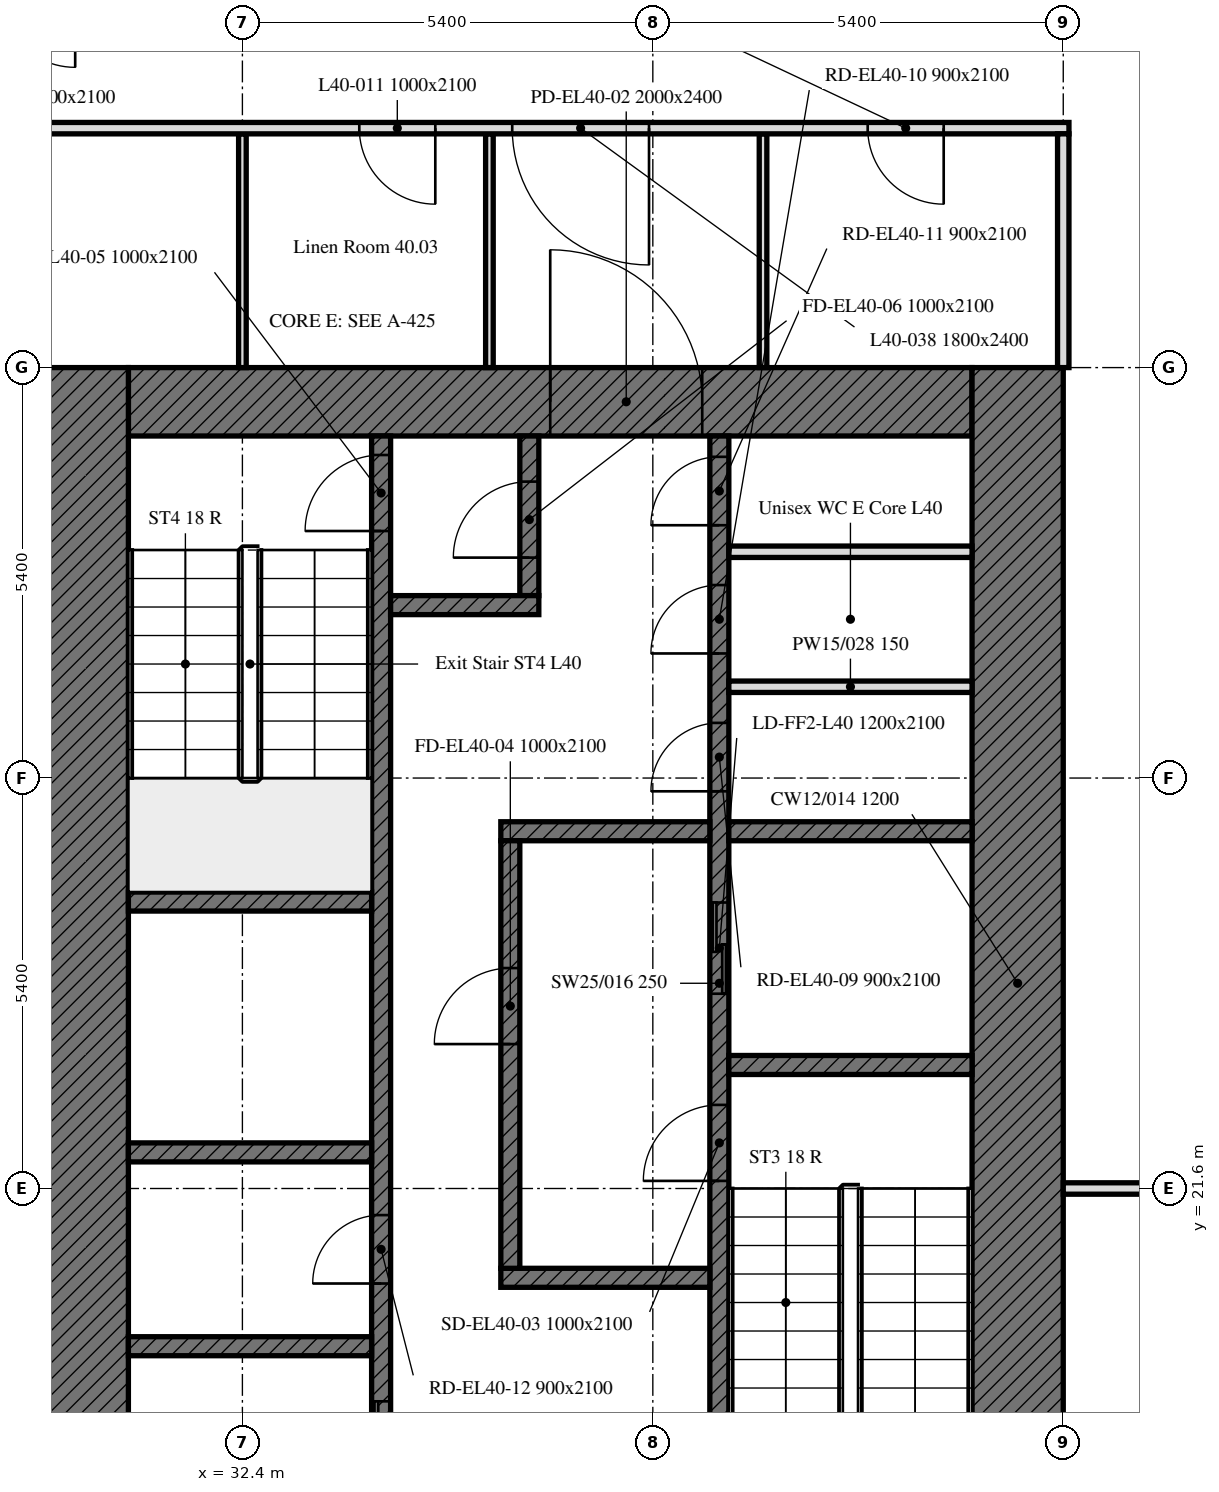
"""IFC4 building model, lengths in metres.
Left out: names, types, materials, properties, quantities, classifications, styles, units other than length and angle.
Written with IfcOpenShell. Run it as: python <this file> out.ifc"""

import sys

from ifc_helpers import new_model, si_unit, direction, frame, frame_2d, origin, place, context, subcontext, project, spatial, rectangle, extrude, element, fill, save


model = new_model("IFC4")
c1 = context("Model", 3, precision=1e-05, world=origin(), true_north=direction((0.0, 1.0)))
c2 = subcontext(c1, "Body", "Model", "MODEL_VIEW")
j1 = project(units=[si_unit("LENGTHUNIT", "METRE"), si_unit("PLANEANGLEUNIT", "RADIAN")], contexts=[c1])
p1 = place(None, origin())
s1 = spatial("IfcSite", under=j1, at=p1, CompositionType="ELEMENT")
p2 = place(p1, origin())
s2 = spatial("IfcBuilding", under=s1, at=p2, CompositionType="ELEMENT")
p3 = place(p2, frame((0.0, 0.0, 169.3)))
s3 = spatial("IfcBuildingStorey", under=s2, at=p3, CompositionType="ELEMENT", Elevation=169.3)
p4 = place(p3, frame((30.9, 31.95, 0.0), z_axis=(0.0, 0.0, 1.0), x_axis=(1.0, 0.0, 0.0)))
e1 = element("IfcWall", 1, at=p4, inside=s3, PredefinedType="SOLIDWALL", context=c2, shape_type="SweptSolid", body=[
    extrude(rectangle(XDim=11.1, YDim=0.9, at=frame_2d((5.55, 0.0))), origin(), (0.0, 0.0, 1.0), 3.0),
])
p5 = place(p4, frame((5.55, 0.0, 0.0)))
e2 = element("IfcOpeningElement", 2, at=p5, cuts=e1, PredefinedType="OPENING", context=c2, shape_type="SweptSolid", body=[
    extrude(rectangle(XDim=2.0, YDim=2.4, at=frame_2d((1.0, 1.2))), frame((0.0, 0.45, 0.0), z_axis=(0.0, -1.0, 0.0), x_axis=(1.0, 0.0, 0.0)), (0.0, 0.0, 1.0), 0.9),
])
for number, where, z_axis, x_axis in (
    (3, (42.6, 32.4, 0.0), (0.0, 0.0, 1.0), (0.0, -1.0, 0.0)),
    (4, (30.3, 16.2, 0.0), (0.0, 0.0, 1.0), (0.0, 1.0, 0.0)),
):
    element("IfcWall", number, at=place(p3, frame(where, z_axis=z_axis, x_axis=x_axis)), inside=s3, PredefinedType="SOLIDWALL", context=c2, shape_type="SweptSolid", body=[
        extrude(rectangle(XDim=16.2, YDim=1.2, at=frame_2d((8.1, 0.0))), origin(), (0.0, 0.0, 1.0), 3.0),
    ])
p6 = place(p3, frame((38.675, 17.1, 0.0), z_axis=(0.0, 0.0, 1.0), x_axis=(0.0, 1.0, 0.0)))
e5 = element("IfcWall", 5, at=p6, inside=s3, PredefinedType="SOLIDWALL", context=c2, shape_type="SweptSolid", body=[
    extrude(rectangle(XDim=14.4, YDim=0.25, at=frame_2d((7.2, 0.0))), origin(), (0.0, 0.0, 1.0), 3.0),
])
p7 = place(p6, frame((4.6, 0.0, 0.0)))
e6 = element("IfcOpeningElement", 6, at=p7, cuts=e5, PredefinedType="OPENING", context=c2, shape_type="SweptSolid", body=[
    extrude(rectangle(XDim=1.0, YDim=2.1, at=frame_2d((0.5, 1.05))), frame((0.0, 0.125, 0.0), z_axis=(0.0, -1.0, 0.0), x_axis=(1.0, 0.0, 0.0)), (0.0, 0.0, 1.0), 0.25),
])
p8 = place(p6, frame((7.062, 0.0, 0.0)))
e7 = element("IfcOpeningElement", 7, at=p8, cuts=e5, PredefinedType="OPENING", context=c2, shape_type="SweptSolid", body=[
    extrude(rectangle(XDim=1.2, YDim=2.1, at=frame_2d((0.6, 1.05))), frame((0.0, 0.125, 0.0), z_axis=(0.0, -1.0, 0.0), x_axis=(1.0, 0.0, 0.0)), (0.0, 0.0, 1.0), 0.25),
])
p9 = place(p6, frame((9.726, 0.0, 0.0)))
e8 = element("IfcOpeningElement", 8, at=p9, cuts=e5, PredefinedType="OPENING", context=c2, shape_type="SweptSolid", body=[
    extrude(rectangle(XDim=0.9, YDim=2.1, at=frame_2d((0.45, 1.05))), frame((0.0, 0.125, 0.0), z_axis=(0.0, -1.0, 0.0), x_axis=(1.0, 0.0, 0.0)), (0.0, 0.0, 1.0), 0.25),
])
p10 = place(p6, frame((11.539, 0.0, 0.0)))
e9 = element("IfcOpeningElement", 9, at=p10, cuts=e5, PredefinedType="OPENING", context=c2, shape_type="SweptSolid", body=[
    extrude(rectangle(XDim=0.9, YDim=2.1, at=frame_2d((0.45, 1.05))), frame((0.0, 0.125, 0.0), z_axis=(0.0, -1.0, 0.0), x_axis=(1.0, 0.0, 0.0)), (0.0, 0.0, 1.0), 0.25),
])
p11 = place(p6, frame((13.226, 0.0, 0.0)))
e10 = element("IfcOpeningElement", 10, at=p11, cuts=e5, PredefinedType="OPENING", context=c2, shape_type="SweptSolid", body=[
    extrude(rectangle(XDim=0.9, YDim=2.1, at=frame_2d((0.45, 1.05))), frame((0.0, 0.125, 0.0), z_axis=(0.0, -1.0, 0.0), x_axis=(1.0, 0.0, 0.0)), (0.0, 0.0, 1.0), 0.25),
])
p12 = place(p3, frame((34.225, 17.1, 0.0), z_axis=(0.0, 0.0, 1.0), x_axis=(0.0, 1.0, 0.0)))
e11 = element("IfcWall", 11, at=p12, inside=s3, PredefinedType="SOLIDWALL", context=c2, shape_type="SweptSolid", body=[
    extrude(rectangle(XDim=14.4, YDim=0.25, at=frame_2d((7.2, 0.0))), origin(), (0.0, 0.0, 1.0), 3.0),
])
p13 = place(p12, frame((13.15, 0.0, 0.0)))
e12 = element("IfcOpeningElement", 12, at=p13, cuts=e11, PredefinedType="OPENING", context=c2, shape_type="SweptSolid", body=[
    extrude(rectangle(XDim=1.0, YDim=2.1, at=frame_2d((0.5, 1.05))), frame((0.0, 0.125, 0.0), z_axis=(0.0, -1.0, 0.0), x_axis=(1.0, 0.0, 0.0)), (0.0, 0.0, 1.0), 0.25),
])
p14 = place(p12, frame((0.6, 0.0, 0.0)))
e13 = element("IfcOpeningElement", 13, at=p14, cuts=e11, PredefinedType="OPENING", context=c2, shape_type="SweptSolid", body=[
    extrude(rectangle(XDim=1.1, YDim=2.1, at=frame_2d((0.55, 1.05))), frame((0.0, 0.125, 0.0), z_axis=(0.0, -1.0, 0.0), x_axis=(1.0, 0.0, 0.0)), (0.0, 0.0, 1.0), 0.25),
])
p15 = place(p12, frame((3.25, 0.0, 0.0)))
e14 = element("IfcOpeningElement", 14, at=p15, cuts=e11, PredefinedType="OPENING", context=c2, shape_type="SweptSolid", body=[
    extrude(rectangle(XDim=0.9, YDim=2.1, at=frame_2d((0.45, 1.05))), frame((0.0, 0.125, 0.0), z_axis=(0.0, -1.0, 0.0), x_axis=(1.0, 0.0, 0.0)), (0.0, 0.0, 1.0), 0.25),
])
p16 = place(p3, frame((38.8, 23.225, 0.0), z_axis=(0.0, 0.0, 1.0), x_axis=(1.0, 0.0, 0.0)))
e15 = element("IfcWall", 15, at=p16, inside=s3, PredefinedType="SOLIDWALL", context=c2, shape_type="SweptSolid", body=[
    extrude(rectangle(XDim=3.2, YDim=0.25, at=frame_2d((1.6, 0.0))), origin(), (0.0, 0.0, 1.0), 3.0),
])
for number, where, z_axis, x_axis in (
    (16, (30.9, 25.375, 0.0), (0.0, 0.0, 1.0), (1.0, 0.0, 0.0)),
    (17, (30.9, 22.075, 0.0), (0.0, 0.0, 1.0), (1.0, 0.0, 0.0)),
):
    element("IfcWall", number, at=place(p3, frame(where, z_axis=z_axis, x_axis=x_axis)), inside=s3, PredefinedType="SOLIDWALL", context=c2, shape_type="SweptSolid", body=[
        extrude(rectangle(XDim=3.2, YDim=0.25, at=frame_2d((1.6, 0.0))), origin(), (0.0, 0.0, 1.0), 3.0),
    ])
p17 = place(p3, frame((38.8, 26.3, 0.0), z_axis=(0.0, 0.0, 1.0), x_axis=(1.0, 0.0, 0.0)))
e18 = element("IfcWall", 18, at=p17, inside=s3, PredefinedType="SOLIDWALL", context=c2, shape_type="SweptSolid", body=[
    extrude(rectangle(XDim=3.2, YDim=0.25, at=frame_2d((1.6, 0.0))), origin(), (0.0, 0.0, 1.0), 3.0),
])
for number, where, z_axis, x_axis in (
    (19, (35.8, 26.3, 0.0), (0.0, 0.0, 1.0), (1.0, 0.0, 0.0)),
    (20, (35.8, 20.425, 0.0), (0.0, 0.0, 1.0), (1.0, 0.0, 0.0)),
):
    element("IfcWall", number, at=place(p3, frame(where, z_axis=z_axis, x_axis=x_axis)), inside=s3, PredefinedType="SOLIDWALL", context=c2, shape_type="SweptSolid", body=[
        extrude(rectangle(XDim=2.75, YDim=0.25, at=frame_2d((1.375, 0.0))), origin(), (0.0, 0.0, 1.0), 3.0),
    ])
p18 = place(p3, frame((36.175, 29.4, 0.0), z_axis=(0.0, 0.0, 1.0), x_axis=(0.0, 1.0, 0.0)))
e21 = element("IfcWall", 21, at=p18, inside=s3, PredefinedType="SOLIDWALL", context=c2, shape_type="SweptSolid", body=[
    extrude(rectangle(XDim=2.1, YDim=0.25, at=frame_2d((1.05, 0.0))), origin(), (0.0, 0.0, 1.0), 3.0),
])
p19 = place(p18, frame((0.5, 0.0, 0.0)))
e22 = element("IfcOpeningElement", 22, at=p19, cuts=e21, PredefinedType="OPENING", context=c2, shape_type="SweptSolid", body=[
    extrude(rectangle(XDim=1.0, YDim=2.1, at=frame_2d((0.5, 1.05))), frame((0.0, 0.125, 0.0), z_axis=(0.0, -1.0, 0.0), x_axis=(1.0, 0.0, 0.0)), (0.0, 0.0, 1.0), 0.25),
])
p20 = place(p3, frame((34.35, 29.275, 0.0), z_axis=(0.0, 0.0, 1.0), x_axis=(1.0, 0.0, 0.0)))
e23 = element("IfcWall", 23, at=p20, inside=s3, PredefinedType="SOLIDWALL", context=c2, shape_type="SweptSolid", body=[
    extrude(rectangle(XDim=1.95, YDim=0.25, at=frame_2d((0.975, 0.0))), origin(), (0.0, 0.0, 1.0), 3.0),
])
p21 = place(p3, frame((35.925, 20.55, 0.0), z_axis=(0.0, 0.0, 1.0), x_axis=(0.0, 1.0, 0.0)))
e24 = element("IfcWall", 24, at=p21, inside=s3, PredefinedType="SOLIDWALL", context=c2, shape_type="SweptSolid", body=[
    extrude(rectangle(XDim=5.625, YDim=0.25, at=frame_2d((2.812, 0.0))), origin(), (0.0, 0.0, 1.0), 3.0),
])
p22 = place(p21, frame((2.95, 0.0, 0.0)))
e25 = element("IfcOpeningElement", 25, at=p22, cuts=e24, PredefinedType="OPENING", context=c2, shape_type="SweptSolid", body=[
    extrude(rectangle(XDim=1.0, YDim=2.1, at=frame_2d((0.5, 1.05))), frame((0.0, 0.125, 0.0), z_axis=(0.0, -1.0, 0.0), x_axis=(1.0, 0.0, 0.0)), (0.0, 0.0, 1.0), 0.25),
])
p23 = place(p3, frame((30.9, 19.525, 0.0), z_axis=(0.0, 0.0, 1.0), x_axis=(1.0, 0.0, 0.0)))
e26 = element("IfcWall", 26, at=p23, inside=s3, PredefinedType="SOLIDWALL", context=c2, shape_type="SweptSolid", body=[
    extrude(rectangle(XDim=3.2, YDim=0.25, at=frame_2d((1.6, 0.0))), origin(), (0.0, 0.0, 1.0), 3.0),
])
for number, where, z_axis, x_axis in (
    (27, (38.8, 28.201, 0.0), (0.0, 0.0, 1.0), (1.0, 0.0, 0.0)),
    (28, (38.8, 29.977, 0.0), (0.0, 0.0, 1.0), (1.0, 0.0, 0.0)),
):
    element("IfcWall", number, at=place(p3, frame(where, z_axis=z_axis, x_axis=x_axis)), inside=s3, PredefinedType="PARTITIONING", context=c2, shape_type="SweptSolid", body=[
        extrude(rectangle(XDim=3.2, YDim=0.15, at=frame_2d((1.6, 0.0))), origin(), (0.0, 0.0, 1.0), 3.0),
    ])
for number, where, z_axis, x_axis in (
    (29, (32.4, 32.4, 0.0), (0.0, 0.0, 1.0), (0.0, 1.0, 0.0)),
    (30, (35.65, 35.475, 0.0), (0.0, 0.0, 1.0), (0.0, -1.0, 0.0)),
    (31, (39.25, 32.4, 0.0), (0.0, 0.0, 1.0), (0.0, 1.0, 0.0)),
):
    element("IfcWall", number, at=place(p3, frame(where, z_axis=z_axis, x_axis=x_axis)), inside=s3, PredefinedType="PARTITIONING", context=c2, shape_type="SweptSolid", body=[
        extrude(rectangle(XDim=3.075, YDim=0.1, at=frame_2d((1.538, 0.0))), origin(), (0.0, 0.0, 1.0), 3.0),
    ])
p24 = place(p3, frame((43.2, 21.6, 0.0), z_axis=(0.0, 0.0, 1.0), x_axis=(1.0, 0.0, 0.0)))
e32 = element("IfcWall", 32, at=p24, inside=s3, PredefinedType="PARTITIONING", context=c2, shape_type="SweptSolid", body=[
    extrude(rectangle(XDim=4.649, YDim=0.15, at=frame_2d((2.325, 0.0))), origin(), (0.0, 0.0, 1.0), 2.4),
])
p25 = place(p3, frame((43.275, 35.55, 0.0), z_axis=(0.0, 0.0, 1.0), x_axis=(-1.0, 0.0, 0.0)))
e33 = element("IfcWall", 33, at=p25, inside=s3, PredefinedType="PARTITIONING", context=c2, shape_type="SweptSolid", body=[
    extrude(rectangle(XDim=33.825, YDim=0.15, at=frame_2d((16.913, 0.0))), origin(), (0.0, 0.0, 1.0), 3.0),
])
p26 = place(p25, frame((23.875, 0.0, 0.0)))
e34 = element("IfcOpeningElement", 34, at=p26, cuts=e33, PredefinedType="OPENING", context=c2, shape_type="SweptSolid", body=[
    extrude(rectangle(XDim=1.0, YDim=2.1, at=frame_2d((0.5, 1.05))), frame((0.0, 0.075, 0.0), z_axis=(0.0, -1.0, 0.0), x_axis=(1.0, 0.0, 0.0)), (0.0, 0.0, 1.0), 0.15),
])
p27 = place(p25, frame((13.475, 0.0, 0.0)))
e35 = element("IfcOpeningElement", 35, at=p27, cuts=e33, PredefinedType="OPENING", context=c2, shape_type="SweptSolid", body=[
    extrude(rectangle(XDim=1.0, YDim=2.1, at=frame_2d((0.5, 1.05))), frame((0.0, 0.075, 0.0), z_axis=(0.0, -1.0, 0.0), x_axis=(1.0, 0.0, 0.0)), (0.0, 0.0, 1.0), 0.15),
])
p28 = place(p25, frame((8.337, 0.0, 0.0)))
e36 = element("IfcOpeningElement", 36, at=p28, cuts=e33, PredefinedType="OPENING", context=c2, shape_type="SweptSolid", body=[
    extrude(rectangle(XDim=1.0, YDim=2.1, at=frame_2d((0.5, 1.05))), frame((0.0, 0.075, 0.0), z_axis=(0.0, -1.0, 0.0), x_axis=(1.0, 0.0, 0.0)), (0.0, 0.0, 1.0), 0.15),
])
p29 = place(p25, frame((1.648, 0.0, 0.0)))
e37 = element("IfcOpeningElement", 37, at=p29, cuts=e33, PredefinedType="OPENING", context=c2, shape_type="SweptSolid", body=[
    extrude(rectangle(XDim=1.0, YDim=2.1, at=frame_2d((0.5, 1.05))), frame((0.0, 0.075, 0.0), z_axis=(0.0, -1.0, 0.0), x_axis=(1.0, 0.0, 0.0)), (0.0, 0.0, 1.0), 0.15),
])
p30 = place(p25, frame((28.613, 0.0, 0.0)))
e38 = element("IfcOpeningElement", 38, at=p30, cuts=e33, PredefinedType="OPENING", context=c2, shape_type="SweptSolid", body=[
    extrude(rectangle(XDim=1.0, YDim=2.1, at=frame_2d((0.5, 1.05))), frame((0.0, 0.075, 0.0), z_axis=(0.0, -1.0, 0.0), x_axis=(1.0, 0.0, 0.0)), (0.0, 0.0, 1.0), 0.15),
])
p31 = place(p25, frame((30.625, 0.0, 0.0)))
e39 = element("IfcOpeningElement", 39, at=p31, cuts=e33, PredefinedType="OPENING", context=c2, shape_type="SweptSolid", body=[
    extrude(rectangle(XDim=1.8, YDim=2.4, at=frame_2d((0.9, 1.2))), frame((0.0, 0.075, 0.0), z_axis=(0.0, -1.0, 0.0), x_axis=(1.0, 0.0, 0.0)), (0.0, 0.0, 1.0), 0.15),
])
p32 = place(p25, frame((5.525, 0.0, 0.0)))
e40 = element("IfcOpeningElement", 40, at=p32, cuts=e33, PredefinedType="OPENING", context=c2, shape_type="SweptSolid", body=[
    extrude(rectangle(XDim=1.8, YDim=2.4, at=frame_2d((0.9, 1.2))), frame((0.0, 0.075, 0.0), z_axis=(0.0, -1.0, 0.0), x_axis=(1.0, 0.0, 0.0)), (0.0, 0.0, 1.0), 0.15),
])
p33 = place(p3, frame((43.2, 35.475, 0.0), z_axis=(0.0, 0.0, 1.0), x_axis=(0.0, -1.0, 0.0)))
e41 = element("IfcWall", 41, at=p33, inside=s3, PredefinedType="PARTITIONING", context=c2, shape_type="SweptSolid", body=[
    extrude(rectangle(XDim=3.075, YDim=0.15, at=frame_2d((1.538, 0.0))), origin(), (0.0, 0.0, 1.0), 3.0),
])
p34 = place(p5, origin())
e42 = element("IfcDoor", 42, at=p34, inside=s3, OperationType="DOUBLE_DOOR_SINGLE_SWING", PredefinedType="DOOR", context=c2, shape_type="SweptSolid", body=[
    extrude(rectangle(XDim=2.0, YDim=2.4, at=frame_2d((1.0, 1.2))), frame((0.0, 0.025, 0.0), z_axis=(0.0, -1.0, 0.0), x_axis=(1.0, 0.0, 0.0)), (0.0, 0.0, 1.0), 0.05),
])
fill(e2, e42)
p35 = place(p7, origin())
e43 = element("IfcDoor", 43, at=p35, inside=s3, OperationType="SINGLE_SWING_LEFT", PredefinedType="DOOR", context=c2, shape_type="SweptSolid", body=[
    extrude(rectangle(XDim=1.0, YDim=2.1, at=frame_2d((0.5, 1.05))), frame((0.0, 0.025, 0.0), z_axis=(0.0, -1.0, 0.0), x_axis=(1.0, 0.0, 0.0)), (0.0, 0.0, 1.0), 0.05),
])
fill(e6, e43)
p36 = place(p22, origin())
e44 = element("IfcDoor", 44, at=p36, inside=s3, OperationType="SINGLE_SWING_LEFT", PredefinedType="DOOR", context=c2, shape_type="SweptSolid", body=[
    extrude(rectangle(XDim=1.0, YDim=2.1, at=frame_2d((0.5, 1.05))), frame((0.0, 0.025, 0.0), z_axis=(0.0, -1.0, 0.0), x_axis=(1.0, 0.0, 0.0)), (0.0, 0.0, 1.0), 0.05),
])
fill(e25, e44)
p37 = place(p13, origin())
e45 = element("IfcDoor", 45, at=p37, inside=s3, OperationType="SINGLE_SWING_LEFT", PredefinedType="DOOR", context=c2, shape_type="SweptSolid", body=[
    extrude(rectangle(XDim=1.0, YDim=2.1, at=frame_2d((0.5, 1.05))), frame((0.0, 0.025, 0.0), z_axis=(0.0, -1.0, 0.0), x_axis=(1.0, 0.0, 0.0)), (0.0, 0.0, 1.0), 0.05),
])
fill(e12, e45)
p38 = place(p19, origin())
e46 = element("IfcDoor", 46, at=p38, inside=s3, OperationType="SINGLE_SWING_LEFT", PredefinedType="DOOR", context=c2, shape_type="SweptSolid", body=[
    extrude(rectangle(XDim=1.0, YDim=2.1, at=frame_2d((0.5, 1.05))), frame((0.0, 0.025, 0.0), z_axis=(0.0, -1.0, 0.0), x_axis=(1.0, 0.0, 0.0)), (0.0, 0.0, 1.0), 0.05),
])
fill(e22, e46)
p39 = place(p8, origin())
e47 = element("IfcDoor", 47, at=p39, inside=s3, OperationType="DOUBLE_DOOR_SLIDING", PredefinedType="DOOR", context=c2, shape_type="SweptSolid", body=[
    extrude(rectangle(XDim=1.2, YDim=2.1, at=frame_2d((0.6, 1.05))), frame((0.0, 0.025, 0.0), z_axis=(0.0, -1.0, 0.0), x_axis=(1.0, 0.0, 0.0)), (0.0, 0.0, 1.0), 0.05),
])
fill(e7, e47)
p40 = place(p14, origin())
e48 = element("IfcDoor", 48, at=p40, inside=s3, OperationType="DOUBLE_DOOR_SLIDING", PredefinedType="DOOR", context=c2, shape_type="SweptSolid", body=[
    extrude(rectangle(XDim=1.1, YDim=2.1, at=frame_2d((0.55, 1.05))), frame((0.0, 0.025, 0.0), z_axis=(0.0, -1.0, 0.0), x_axis=(1.0, 0.0, 0.0)), (0.0, 0.0, 1.0), 0.05),
])
fill(e13, e48)
p41 = place(p9, origin())
e49 = element("IfcDoor", 49, at=p41, inside=s3, OperationType="SINGLE_SWING_LEFT", PredefinedType="DOOR", context=c2, shape_type="SweptSolid", body=[
    extrude(rectangle(XDim=0.9, YDim=2.1, at=frame_2d((0.45, 1.05))), frame((0.0, 0.025, 0.0), z_axis=(0.0, -1.0, 0.0), x_axis=(1.0, 0.0, 0.0)), (0.0, 0.0, 1.0), 0.05),
])
fill(e8, e49)
p42 = place(p10, origin())
e50 = element("IfcDoor", 50, at=p42, inside=s3, OperationType="SINGLE_SWING_LEFT", PredefinedType="DOOR", context=c2, shape_type="SweptSolid", body=[
    extrude(rectangle(XDim=0.9, YDim=2.1, at=frame_2d((0.45, 1.05))), frame((0.0, 0.025, 0.0), z_axis=(0.0, -1.0, 0.0), x_axis=(1.0, 0.0, 0.0)), (0.0, 0.0, 1.0), 0.05),
])
fill(e9, e50)
p43 = place(p11, origin())
e51 = element("IfcDoor", 51, at=p43, inside=s3, OperationType="SINGLE_SWING_LEFT", PredefinedType="DOOR", context=c2, shape_type="SweptSolid", body=[
    extrude(rectangle(XDim=0.9, YDim=2.1, at=frame_2d((0.45, 1.05))), frame((0.0, 0.025, 0.0), z_axis=(0.0, -1.0, 0.0), x_axis=(1.0, 0.0, 0.0)), (0.0, 0.0, 1.0), 0.05),
])
fill(e10, e51)
p44 = place(p15, origin())
e52 = element("IfcDoor", 52, at=p44, inside=s3, OperationType="SINGLE_SWING_LEFT", PredefinedType="DOOR", context=c2, shape_type="SweptSolid", body=[
    extrude(rectangle(XDim=0.9, YDim=2.1, at=frame_2d((0.45, 1.05))), frame((0.0, 0.025, 0.0), z_axis=(0.0, -1.0, 0.0), x_axis=(1.0, 0.0, 0.0)), (0.0, 0.0, 1.0), 0.05),
])
fill(e14, e52)
p45 = place(p28, origin())
e53 = element("IfcDoor", 53, at=p45, inside=s3, OperationType="SINGLE_SWING_RIGHT", PredefinedType="DOOR", context=c2, shape_type="SweptSolid", body=[
    extrude(rectangle(XDim=1.0, YDim=2.1, at=frame_2d((0.5, 1.05))), frame((0.0, 0.025, 0.0), z_axis=(0.0, -1.0, 0.0), x_axis=(1.0, 0.0, 0.0)), (0.0, 0.0, 1.0), 0.05),
])
fill(e36, e53)
p46 = place(p29, origin())
e54 = element("IfcDoor", 54, at=p46, inside=s3, OperationType="SINGLE_SWING_LEFT", PredefinedType="DOOR", context=c2, shape_type="SweptSolid", body=[
    extrude(rectangle(XDim=1.0, YDim=2.1, at=frame_2d((0.5, 1.05))), frame((0.0, 0.025, 0.0), z_axis=(0.0, -1.0, 0.0), x_axis=(1.0, 0.0, 0.0)), (0.0, 0.0, 1.0), 0.05),
])
fill(e37, e54)
p47 = place(p32, origin())
e55 = element("IfcDoor", 55, at=p47, inside=s3, OperationType="DOUBLE_DOOR_SINGLE_SWING", PredefinedType="DOOR", context=c2, shape_type="SweptSolid", body=[
    extrude(rectangle(XDim=1.8, YDim=2.4, at=frame_2d((0.9, 1.2))), frame((0.0, 0.025, 0.0), z_axis=(0.0, -1.0, 0.0), x_axis=(1.0, 0.0, 0.0)), (0.0, 0.0, 1.0), 0.05),
])
fill(e40, e55)
save(model, sys.argv[1])
